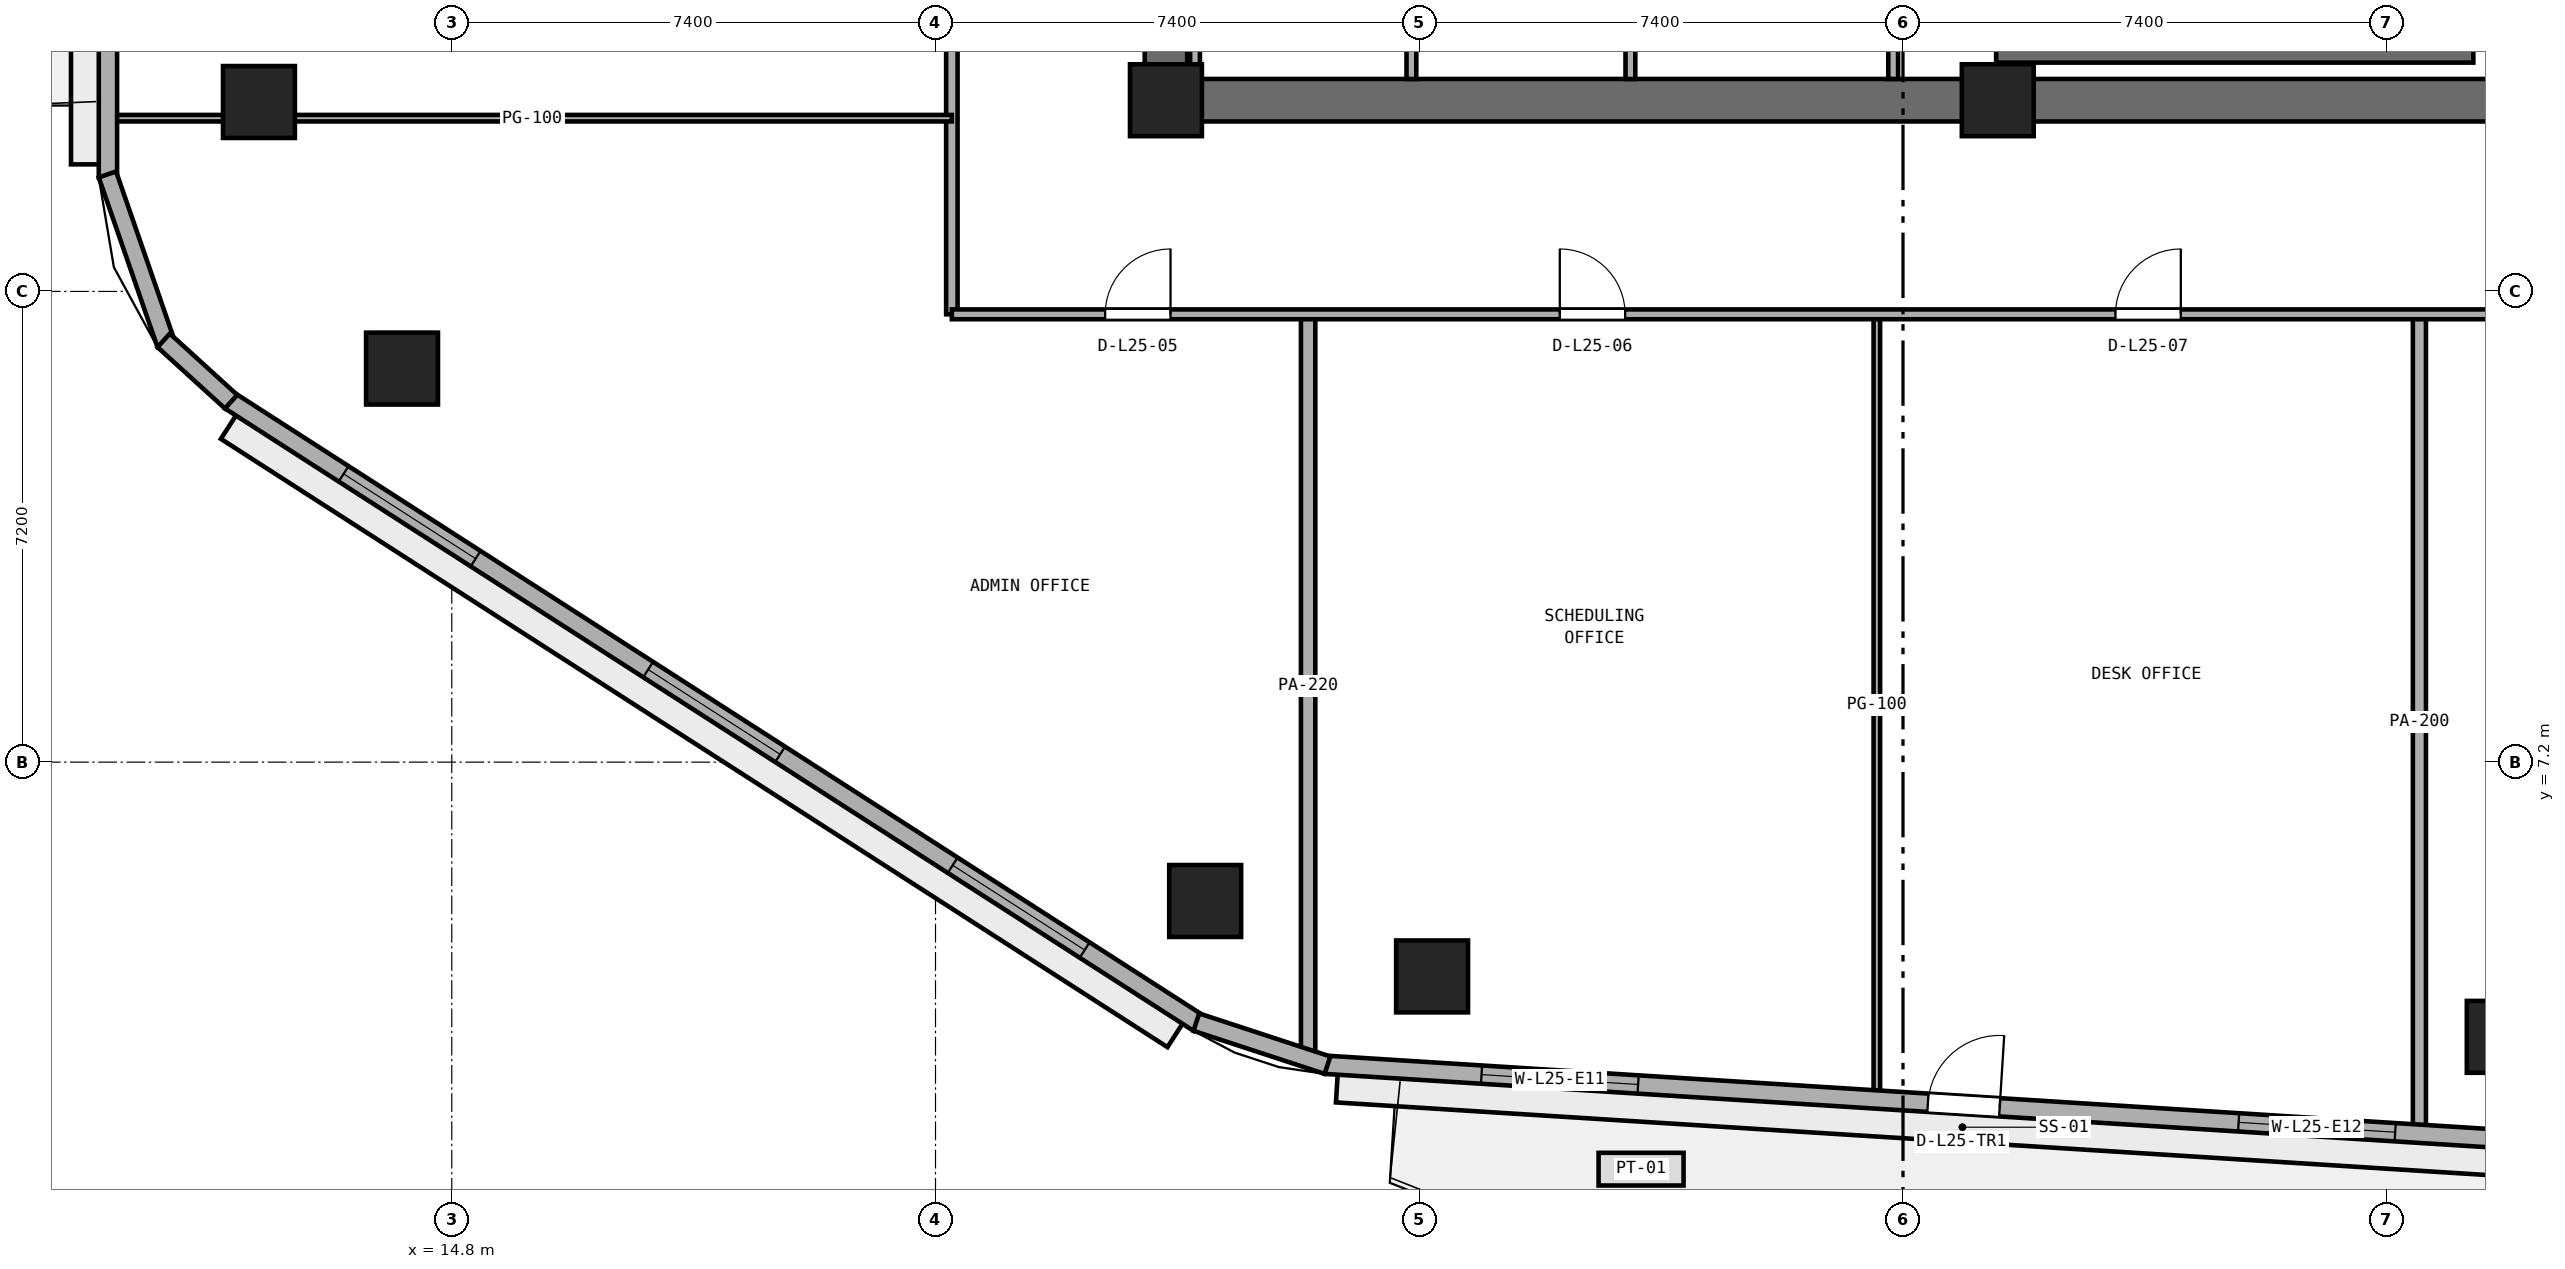
"""IFC4 building model, lengths in metres.
Left out: names, types, materials, properties, quantities, classifications, styles, units other than length and angle.
Written with IfcOpenShell. Run it as: python <this file> out.ifc"""

import sys

from ifc_helpers import new_model, si_unit, direction, frame, frame_2d, origin, origin_2d, place, context, subcontext, project, spatial, rectangle, extrude, element, fill, save


model = new_model("IFC4")
c1 = context("Model", 3, precision=1e-05, world=origin(), true_north=direction((0.0, 1.0)))
c2 = subcontext(c1, "Body", "Model", "MODEL_VIEW")
j1 = project(units=[si_unit("LENGTHUNIT", "METRE"), si_unit("PLANEANGLEUNIT", "RADIAN")], contexts=[c1])
p1 = place(None, origin())
s1 = spatial("IfcSite", under=j1, at=p1, CompositionType="ELEMENT")
p2 = place(p1, origin())
s2 = spatial("IfcBuilding", under=s1, at=p2, CompositionType="ELEMENT")
p3 = place(p2, frame((0.0, 0.0, 101.0)))
s3 = spatial("IfcBuildingStorey", under=s2, at=p3, CompositionType="ELEMENT", Elevation=101.0)
p4 = place(p3, frame((25.4, 17.325, 0.0), z_axis=(0.0, 0.0, 1.0), x_axis=(1.0, 0.0, 0.0)))
e1 = element("IfcWall", 1, at=p4, inside=s3, PredefinedType="SHEAR", context=c2, shape_type="SweptSolid", body=[
    extrude(rectangle(XDim=23.2, YDim=0.65, at=frame_2d((11.6, 0.0))), origin(), (0.0, 0.0, 1.0), 3.525),
])
p5 = place(p3, frame((25.725, 17.65, 0.0), z_axis=(0.0, 0.0, 1.0), x_axis=(0.0, 1.0, 0.0)))
e2 = element("IfcWall", 2, at=p5, inside=s3, PredefinedType="SHEAR", context=c2, shape_type="SweptSolid", body=[
    extrude(rectangle(XDim=15.1, YDim=0.65, at=frame_2d((7.55, 0.0))), origin(), (0.0, 0.0, 1.0), 3.525),
])
p6 = place(p5, frame((6.8, 0.0, 0.0)))
e3 = element("IfcOpeningElement", 3, at=p6, cuts=e2, PredefinedType="OPENING", context=c2, shape_type="SweptSolid", body=[
    extrude(rectangle(XDim=1.5, YDim=2.15, at=frame_2d((0.75, 1.075))), frame((0.0, 0.335, 0.0), z_axis=(0.0, -1.0, 0.0), x_axis=(1.0, 0.0, 0.0)), (0.0, 0.0, 1.0), 0.67),
])
for number, where, z_axis, x_axis in (
    (4, (25.725, 17.325, 0.0), (0.0, 0.0, 1.0), (1.0, 0.0, 0.0)),
    (5, (38.45, 17.325, 0.0), (0.0, 0.0, 1.0), (1.0, 0.0, 0.0)),
):
    element("IfcColumn", number, at=place(p3, frame(where, z_axis=z_axis, x_axis=x_axis)), inside=s3, PredefinedType="PILASTER", context=c2, shape_type="SweptSolid", body=[
        extrude(rectangle(XDim=1.1, YDim=1.1, at=origin_2d()), origin(), (0.0, 0.0, 1.0), 3.8),
    ])
for number, where, z_axis, x_axis in (
    (6, (29.796, 3.922, 0.0), (0.0, 0.0, 1.0), (1.0, 0.0, 0.0)),
    (7, (46.175, 2.998, 0.0), (0.0, 0.0, 1.0), (1.0, 0.0, 0.0)),
    (8, (11.85, 17.298, 0.0), (0.0, 0.0, 1.0), (1.0, 0.0, 0.0)),
    (9, (14.039, 13.22, 0.0), (0.0, 0.0, 1.0), (1.0, 0.0, 0.0)),
    (10, (26.325, 5.076, 0.0), (0.0, 0.0, 1.0), (1.0, 0.0, 0.0)),
):
    element("IfcColumn", number, at=place(p3, frame(where, z_axis=z_axis, x_axis=x_axis)), inside=s3, PredefinedType="COLUMN", context=c2, shape_type="SweptSolid", body=[
        extrude(rectangle(XDim=1.1, YDim=1.1, at=origin_2d()), origin(), (0.0, 0.0, 1.0), 3.8),
    ])
p7 = place(p3, frame((38.425, 18.025, 0.0), z_axis=(0.0, 0.0, 1.0), x_axis=(1.0, 0.0, 0.0)))
e11 = element("IfcWall", 11, at=p7, inside=s3, PredefinedType="SHEAR", context=c2, shape_type="SweptSolid", body=[
    extrude(rectangle(XDim=7.3, YDim=0.25, at=frame_2d((3.65, 0.0))), origin(), (0.0, 0.0, 1.0), 3.525),
])
for number, where, z_axis, x_axis in (
    (12, (26.17, 17.65, 0.0), (0.0, 0.0, 1.0), (0.0, 1.0, 0.0)),
    (13, (29.48, 17.65, 0.0), (0.0, 0.0, 1.0), (0.0, 1.0, 0.0)),
    (14, (32.83, 17.65, 0.0), (0.0, 0.0, 1.0), (0.0, 1.0, 0.0)),
    (15, (36.85, 17.65, 0.0), (0.0, 0.0, 1.0), (0.0, 1.0, 0.0)),
):
    element("IfcWall", number, at=place(p3, frame(where, z_axis=z_axis, x_axis=x_axis)), inside=s3, PredefinedType="PARTITIONING", context=c2, shape_type="SweptSolid", body=[
        extrude(rectangle(XDim=2.1, YDim=0.15, at=frame_2d((1.05, 0.0))), origin(), (0.0, 0.0, 1.0), 3.525),
    ])
p8 = place(p3, frame((44.9, 1.58, 0.0), z_axis=(0.0, 0.0, 1.0), x_axis=(0.0, 1.0, 0.0)))
e16 = element("IfcWall", 16, at=p8, inside=s3, PredefinedType="PARTITIONING", context=c2, shape_type="SweptSolid", body=[
    extrude(rectangle(XDim=12.47, YDim=0.2, at=frame_2d((6.235, 0.0))), origin(), (0.0, 0.0, 1.0), 3.525),
])
p9 = place(p3, frame((36.6, 2.104, 0.0), z_axis=(0.0, 0.0, 1.0), x_axis=(0.0, 1.0, 0.0)))
e17 = element("IfcWall", 17, at=p9, inside=s3, PredefinedType="PARTITIONING", context=c2, shape_type="SweptSolid", body=[
    extrude(rectangle(XDim=11.947, YDim=0.1, at=frame_2d((5.973, 0.0))), origin(), (0.0, 0.0, 1.0), 3.525),
])
p10 = place(p3, frame((27.9, 2.674, 0.0), z_axis=(0.0, 0.0, 1.0), x_axis=(0.0, 1.0, 0.0)))
e18 = element("IfcWall", 18, at=p10, inside=s3, PredefinedType="PARTITIONING", context=c2, shape_type="SweptSolid", body=[
    extrude(rectangle(XDim=11.376, YDim=0.22, at=frame_2d((5.688, 0.0))), origin(), (0.0, 0.0, 1.0), 3.525),
])
p11 = place(p3, frame((22.45, 14.05, 0.0), z_axis=(0.0, 0.0, 1.0), x_axis=(0.0, 1.0, 0.0)))
e19 = element("IfcWall", 19, at=p11, inside=s3, PredefinedType="PARTITIONING", context=c2, shape_type="SweptSolid", body=[
    extrude(rectangle(XDim=22.3, YDim=0.175, at=frame_2d((11.15, 0.0))), origin(), (0.0, 0.0, 1.0), 3.525),
])
p12 = place(p11, frame((5.075, 0.0, 0.0)))
e20 = element("IfcOpeningElement", 20, at=p12, cuts=e19, PredefinedType="OPENING", context=c2, shape_type="SweptSolid", body=[
    extrude(rectangle(XDim=0.9, YDim=2.1, at=frame_2d((0.45, 1.05))), frame((0.0, 0.097, 0.0), z_axis=(0.0, -1.0, 0.0), x_axis=(1.0, 0.0, 0.0)), (0.0, 0.0, 1.0), 0.195),
])
p13 = place(p11, frame((11.35, 0.0, 0.0)))
e21 = element("IfcOpeningElement", 21, at=p13, cuts=e19, PredefinedType="OPENING", context=c2, shape_type="SweptSolid", body=[
    extrude(rectangle(XDim=0.9, YDim=2.1, at=frame_2d((0.45, 1.05))), frame((0.0, 0.097, 0.0), z_axis=(0.0, -1.0, 0.0), x_axis=(1.0, 0.0, 0.0)), (0.0, 0.0, 1.0), 0.195),
])
p14 = place(p11, frame((16.975, 0.0, 0.0)))
e22 = element("IfcOpeningElement", 22, at=p14, cuts=e19, PredefinedType="OPENING", context=c2, shape_type="SweptSolid", body=[
    extrude(rectangle(XDim=0.9, YDim=2.1, at=frame_2d((0.45, 1.05))), frame((0.0, 0.097, 0.0), z_axis=(0.0, -1.0, 0.0), x_axis=(1.0, 0.0, 0.0)), (0.0, 0.0, 1.0), 0.195),
])
p15 = place(p3, frame((22.45, 14.05, 0.0), z_axis=(0.0, 0.0, 1.0), x_axis=(1.0, 0.0, 0.0)))
e23 = element("IfcWall", 23, at=p15, inside=s3, PredefinedType="PARTITIONING", context=c2, shape_type="SweptSolid", body=[
    extrude(rectangle(XDim=29.1, YDim=0.15, at=frame_2d((14.55, 0.0))), origin(), (0.0, 0.0, 1.0), 3.525),
])
p16 = place(p15, frame((2.345, 0.0, 0.0)))
e24 = element("IfcOpeningElement", 24, at=p16, cuts=e23, PredefinedType="OPENING", context=c2, shape_type="SweptSolid", body=[
    extrude(rectangle(XDim=1.0, YDim=2.12, at=frame_2d((0.5, 1.06))), frame((0.0, 0.085, 0.0), z_axis=(0.0, -1.0, 0.0), x_axis=(1.0, 0.0, 0.0)), (0.0, 0.0, 1.0), 0.17),
])
p17 = place(p15, frame((9.3, 0.0, 0.0)))
e25 = element("IfcOpeningElement", 25, at=p17, cuts=e23, PredefinedType="OPENING", context=c2, shape_type="SweptSolid", body=[
    extrude(rectangle(XDim=1.0, YDim=2.12, at=frame_2d((0.5, 1.06))), frame((0.0, 0.085, 0.0), z_axis=(0.0, -1.0, 0.0), x_axis=(1.0, 0.0, 0.0)), (0.0, 0.0, 1.0), 0.17),
])
p18 = place(p15, frame((17.8, 0.0, 0.0)))
e26 = element("IfcOpeningElement", 26, at=p18, cuts=e23, PredefinedType="OPENING", context=c2, shape_type="SweptSolid", body=[
    extrude(rectangle(XDim=1.0, YDim=2.12, at=frame_2d((0.5, 1.06))), frame((0.0, 0.085, 0.0), z_axis=(0.0, -1.0, 0.0), x_axis=(1.0, 0.0, 0.0)), (0.0, 0.0, 1.0), 0.17),
])
p19 = place(p15, frame((25.155, 0.0, 0.0)))
e27 = element("IfcOpeningElement", 27, at=p19, cuts=e23, PredefinedType="OPENING", context=c2, shape_type="SweptSolid", body=[
    extrude(rectangle(XDim=1.0, YDim=2.12, at=frame_2d((0.5, 1.06))), frame((0.0, 0.085, 0.0), z_axis=(0.0, -1.0, 0.0), x_axis=(1.0, 0.0, 0.0)), (0.0, 0.0, 1.0), 0.17),
])
p20 = place(p3, frame((9.605, 17.05, 0.0), z_axis=(0.0, 0.0, 1.0), x_axis=(1.0, 0.0, 0.0)))
e28 = element("IfcWall", 28, at=p20, inside=s3, PredefinedType="PARTITIONING", context=c2, shape_type="SweptSolid", body=[
    extrude(rectangle(XDim=12.845, YDim=0.1, at=frame_2d((6.422, 0.0))), origin(), (0.0, 0.0, 1.0), 3.525),
])
p21 = place(p3, frame((28.161, 2.571, 0.0), z_axis=(0.0, 0.0, 1.0), x_axis=(0.998017288298, -0.06294038654, 0.0)))
e29 = element("IfcWall", 29, at=p21, inside=s3, PredefinedType="STANDARD", context=c2, shape_type="SweptSolid", body=[
    extrude(rectangle(XDim=19.577, YDim=0.28, at=frame_2d((9.789, 0.0))), origin(), (0.0, 0.0, 1.0), 3.525),
])
p22 = place(p21, frame((9.239, 0.0, 0.0)))
e30 = element("IfcOpeningElement", 30, at=p22, cuts=e29, PredefinedType="OPENING", context=c2, shape_type="SweptSolid", body=[
    extrude(rectangle(XDim=1.1, YDim=2.2, at=frame_2d((0.55, 1.1))), frame((0.0, 0.15, 0.0), z_axis=(0.0, -1.0, 0.0), x_axis=(1.0, 0.0, 0.0)), (0.0, 0.0, 1.0), 0.3),
])
p23 = place(p21, frame((2.396, 0.0, 0.9)))
e31 = element("IfcOpeningElement", 31, at=p23, cuts=e29, PredefinedType="OPENING", context=c2, shape_type="SweptSolid", body=[
    extrude(rectangle(XDim=2.4, YDim=1.75, at=frame_2d((1.2, 0.875))), frame((0.0, 0.15, 0.0), z_axis=(0.0, -1.0, 0.0), x_axis=(1.0, 0.0, 0.0)), (0.0, 0.0, 1.0), 0.3),
])
p24 = place(p21, frame((14.001, 0.0, 0.9)))
e32 = element("IfcOpeningElement", 32, at=p24, cuts=e29, PredefinedType="OPENING", context=c2, shape_type="SweptSolid", body=[
    extrude(rectangle(XDim=2.4, YDim=1.75, at=frame_2d((1.2, 0.875))), frame((0.0, 0.15, 0.0), z_axis=(0.0, -1.0, 0.0), x_axis=(1.0, 0.0, 0.0)), (0.0, 0.0, 1.0), 0.3),
])
p25 = place(p3, frame((9.54, 33.444, 0.0), z_axis=(0.0, 0.0, 1.0), x_axis=(0.0, -1.0, 0.0)))
e33 = element("IfcWall", 33, at=p25, inside=s3, PredefinedType="STANDARD", context=c2, shape_type="SweptSolid", body=[
    extrude(rectangle(XDim=17.301, YDim=0.28, at=frame_2d((8.65, 0.0))), origin(), (0.0, 0.0, 1.0), 3.525),
])
p26 = place(p25, frame((8.1, 0.0, 0.0)))
e34 = element("IfcOpeningElement", 34, at=p26, cuts=e33, PredefinedType="OPENING", context=c2, shape_type="SweptSolid", body=[
    extrude(rectangle(XDim=1.1, YDim=2.2, at=frame_2d((0.55, 1.1))), frame((0.0, 0.15, 0.0), z_axis=(0.0, -1.0, 0.0), x_axis=(1.0, 0.0, 0.0)), (0.0, 0.0, 1.0), 0.3),
])
p27 = place(p25, frame((12.884, 0.0, 0.9)))
e35 = element("IfcOpeningElement", 35, at=p27, cuts=e33, PredefinedType="OPENING", context=c2, shape_type="SweptSolid", body=[
    extrude(rectangle(XDim=2.4, YDim=1.75, at=frame_2d((1.2, 0.875))), frame((0.0, 0.15, 0.0), z_axis=(0.0, -1.0, 0.0), x_axis=(1.0, 0.0, 0.0)), (0.0, 0.0, 1.0), 0.3),
])
p28 = place(p3, frame((11.405, 12.728, 0.0), z_axis=(0.0, 0.0, 1.0), x_axis=(0.841304564637, -0.540561402175, 0.0)))
e36 = element("IfcWall", 36, at=p28, inside=s3, PredefinedType="STANDARD", context=c2, shape_type="SweptSolid", body=[
    extrude(rectangle(XDim=17.612, YDim=0.28, at=frame_2d((8.806, 0.0))), origin(), (0.0, 0.0, 1.0), 3.525),
])
p29 = place(p28, frame((2.069, 0.0, 0.9)))
e37 = element("IfcOpeningElement", 37, at=p29, cuts=e36, PredefinedType="OPENING", context=c2, shape_type="SweptSolid", body=[
    extrude(rectangle(XDim=2.4, YDim=1.75, at=frame_2d((1.2, 0.875))), frame((0.0, 0.15, 0.0), z_axis=(0.0, -1.0, 0.0), x_axis=(1.0, 0.0, 0.0)), (0.0, 0.0, 1.0), 0.3),
])
p30 = place(p28, frame((7.606, 0.0, 0.9)))
e38 = element("IfcOpeningElement", 38, at=p30, cuts=e36, PredefinedType="OPENING", context=c2, shape_type="SweptSolid", body=[
    extrude(rectangle(XDim=2.4, YDim=1.75, at=frame_2d((1.2, 0.875))), frame((0.0, 0.15, 0.0), z_axis=(0.0, -1.0, 0.0), x_axis=(1.0, 0.0, 0.0)), (0.0, 0.0, 1.0), 0.3),
])
p31 = place(p28, frame((13.143, 0.0, 0.9)))
e39 = element("IfcOpeningElement", 39, at=p31, cuts=e36, PredefinedType="OPENING", context=c2, shape_type="SweptSolid", body=[
    extrude(rectangle(XDim=2.4, YDim=1.75, at=frame_2d((1.2, 0.875))), frame((0.0, 0.15, 0.0), z_axis=(0.0, -1.0, 0.0), x_axis=(1.0, 0.0, 0.0)), (0.0, 0.0, 1.0), 0.3),
])
p32 = place(p3, frame((9.532, 16.189, 0.0), z_axis=(0.0, 0.0, 1.0), x_axis=(0.32708309668, -0.944995580871, 0.0)))
e40 = element("IfcWall", 40, at=p32, inside=s3, PredefinedType="STANDARD", context=c2, shape_type="SweptSolid", body=[
    extrude(rectangle(XDim=2.748, YDim=0.28, at=frame_2d((1.374, 0.0))), origin(), (0.0, 0.0, 1.0), 3.525),
])
p33 = place(p3, frame((10.393, 13.651, 0.0), z_axis=(0.0, 0.0, 1.0), x_axis=(0.74003521851, -0.672568119498, 0.0)))
e41 = element("IfcWall", 41, at=p33, inside=s3, PredefinedType="STANDARD", context=c2, shape_type="SweptSolid", body=[
    extrude(rectangle(XDim=1.393, YDim=0.28, at=frame_2d((0.697, 0.0))), origin(), (0.0, 0.0, 1.0), 3.525),
])
p34 = place(p3, frame((26.19, 3.223, 0.0), z_axis=(0.0, 0.0, 1.0), x_axis=(0.95016442175, -0.311749212734, 0.0)))
e42 = element("IfcWall", 42, at=p34, inside=s3, PredefinedType="STANDARD", context=c2, shape_type="SweptSolid", body=[
    extrude(rectangle(XDim=2.111, YDim=0.28, at=frame_2d((1.056, 0.0))), origin(), (0.0, 0.0, 1.0), 3.525),
])
p35 = place(p16, origin())
e43 = element("IfcDoor", 43, at=p35, inside=s3, OperationType="SINGLE_SWING_RIGHT", PredefinedType="DOOR", context=c2, shape_type="SweptSolid", body=[
    extrude(rectangle(XDim=1.0, YDim=2.12, at=frame_2d((0.5, 1.06))), frame((0.0, 0.025, 0.0), z_axis=(0.0, -1.0, 0.0), x_axis=(1.0, 0.0, 0.0)), (0.0, 0.0, 1.0), 0.05),
])
fill(e24, e43)
p36 = place(p17, origin())
e44 = element("IfcDoor", 44, at=p36, inside=s3, OperationType="SINGLE_SWING_LEFT", PredefinedType="DOOR", context=c2, shape_type="SweptSolid", body=[
    extrude(rectangle(XDim=1.0, YDim=2.12, at=frame_2d((0.5, 1.06))), frame((0.0, 0.025, 0.0), z_axis=(0.0, -1.0, 0.0), x_axis=(1.0, 0.0, 0.0)), (0.0, 0.0, 1.0), 0.05),
])
fill(e25, e44)
p37 = place(p18, origin())
e45 = element("IfcDoor", 45, at=p37, inside=s3, OperationType="SINGLE_SWING_RIGHT", PredefinedType="DOOR", context=c2, shape_type="SweptSolid", body=[
    extrude(rectangle(XDim=1.0, YDim=2.12, at=frame_2d((0.5, 1.06))), frame((0.0, 0.025, 0.0), z_axis=(0.0, -1.0, 0.0), x_axis=(1.0, 0.0, 0.0)), (0.0, 0.0, 1.0), 0.05),
])
fill(e26, e45)
p38 = place(p22, origin())
e46 = element("IfcDoor", 46, at=p38, inside=s3, OperationType="SINGLE_SWING_RIGHT", PredefinedType="DOOR", context=c2, shape_type="SweptSolid", body=[
    extrude(rectangle(XDim=1.1, YDim=2.2, at=frame_2d((0.55, 1.1))), frame((0.0, 0.025, 0.0), z_axis=(0.0, -1.0, 0.0), x_axis=(1.0, 0.0, 0.0)), (0.0, 0.0, 1.0), 0.05),
])
fill(e30, e46)
p39 = place(p23, origin())
e47 = element("IfcWindow", 47, at=p39, inside=s3, PartitioningType="SINGLE_PANEL", PredefinedType="WINDOW", context=c2, shape_type="SweptSolid", body=[
    extrude(rectangle(XDim=2.4, YDim=1.75, at=frame_2d((1.2, 0.875))), frame((0.0, 0.03, 0.0), z_axis=(0.0, -1.0, 0.0), x_axis=(1.0, 0.0, 0.0)), (0.0, 0.0, 1.0), 0.06),
])
fill(e31, e47)
p40 = place(p24, origin())
e48 = element("IfcWindow", 48, at=p40, inside=s3, PartitioningType="SINGLE_PANEL", PredefinedType="WINDOW", context=c2, shape_type="SweptSolid", body=[
    extrude(rectangle(XDim=2.4, YDim=1.75, at=frame_2d((1.2, 0.875))), frame((0.0, 0.03, 0.0), z_axis=(0.0, -1.0, 0.0), x_axis=(1.0, 0.0, 0.0)), (0.0, 0.0, 1.0), 0.06),
])
fill(e32, e48)
p41 = place(p29, origin())
e49 = element("IfcWindow", 49, at=p41, inside=s3, PartitioningType="SINGLE_PANEL", PredefinedType="WINDOW", context=c2, shape_type="SweptSolid", body=[
    extrude(rectangle(XDim=2.4, YDim=1.75, at=frame_2d((1.2, 0.875))), frame((0.0, 0.03, 0.0), z_axis=(0.0, -1.0, 0.0), x_axis=(1.0, 0.0, 0.0)), (0.0, 0.0, 1.0), 0.06),
])
fill(e37, e49)
p42 = place(p30, origin())
e50 = element("IfcWindow", 50, at=p42, inside=s3, PartitioningType="SINGLE_PANEL", PredefinedType="WINDOW", context=c2, shape_type="SweptSolid", body=[
    extrude(rectangle(XDim=2.4, YDim=1.75, at=frame_2d((1.2, 0.875))), frame((0.0, 0.03, 0.0), z_axis=(0.0, -1.0, 0.0), x_axis=(1.0, 0.0, 0.0)), (0.0, 0.0, 1.0), 0.06),
])
fill(e38, e50)
p43 = place(p31, origin())
e51 = element("IfcWindow", 51, at=p43, inside=s3, PartitioningType="SINGLE_PANEL", PredefinedType="WINDOW", context=c2, shape_type="SweptSolid", body=[
    extrude(rectangle(XDim=2.4, YDim=1.75, at=frame_2d((1.2, 0.875))), frame((0.0, 0.03, 0.0), z_axis=(0.0, -1.0, 0.0), x_axis=(1.0, 0.0, 0.0)), (0.0, 0.0, 1.0), 0.06),
])
fill(e39, e51)
save(model, sys.argv[1])
